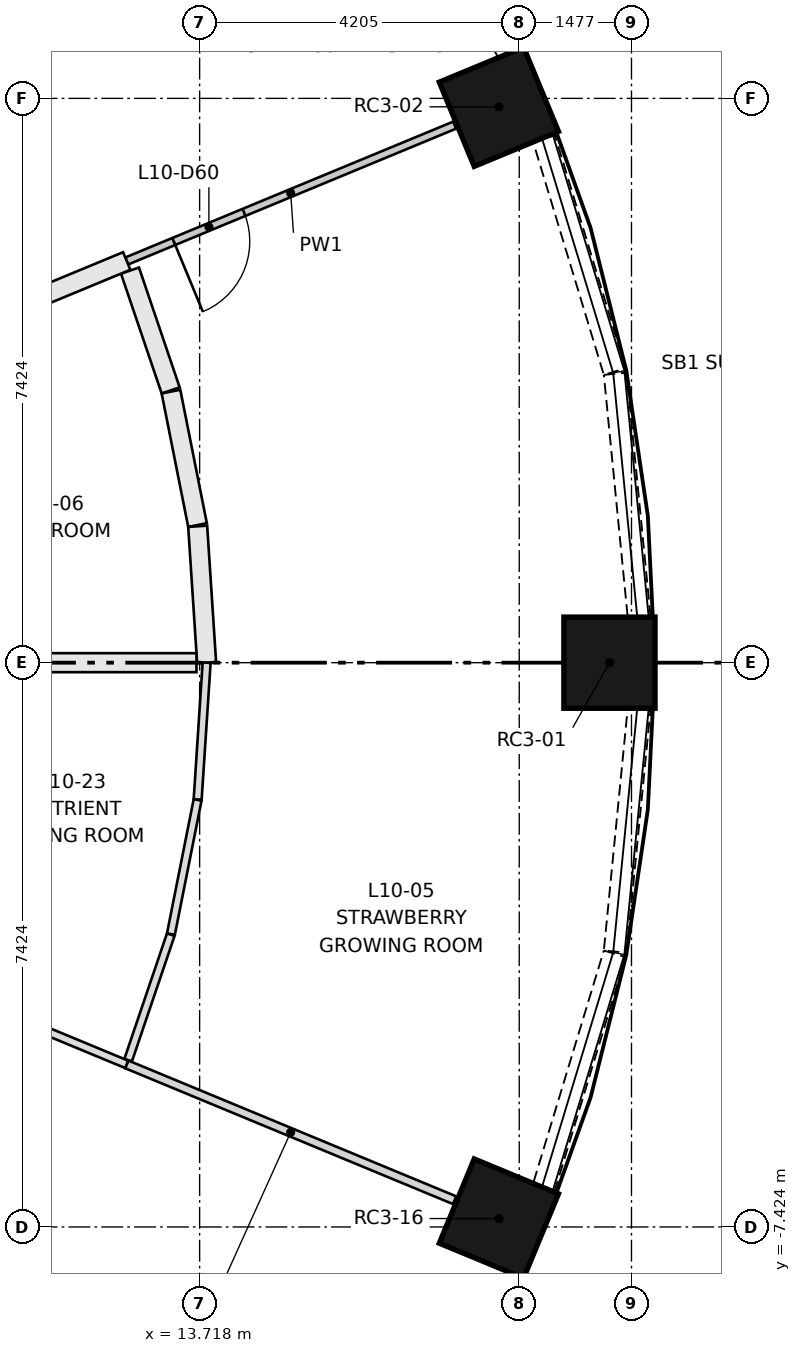
"""IFC4 building model, lengths in metres.
Left out: names, types, materials, properties, quantities, classifications, styles, units other than length and angle.
Written with IfcOpenShell. Run it as: python <this file> out.ifc"""

import sys

from ifc_helpers import new_model, si_unit, direction, frame, frame_2d, origin, origin_2d, place, context, subcontext, project, spatial, rectangle, extrude, element, fill, save


model = new_model("IFC4")
c1 = context("Model", 3, precision=1e-05, world=origin(), true_north=direction((0.0, 1.0)))
c2 = subcontext(c1, "Body", "Model", "MODEL_VIEW")
j1 = project(units=[si_unit("LENGTHUNIT", "METRE"), si_unit("PLANEANGLEUNIT", "RADIAN")], contexts=[c1])
p1 = place(None, origin())
s1 = spatial("IfcSite", under=j1, at=p1, CompositionType="ELEMENT")
p2 = place(p1, origin())
s2 = spatial("IfcBuilding", under=s1, at=p2, CompositionType="ELEMENT")
p3 = place(p2, frame((0.0, 0.0, 40.8)))
s3 = spatial("IfcBuildingStorey", under=s2, at=p3, CompositionType="ELEMENT", Elevation=40.8)
for number, where, z_axis, x_axis in (
    (1, (19.11, 0.0, 0.0), (0.0, 0.0, 1.0), (1.0, 0.0, 0.0)),
    (2, (17.655, 7.313, 0.0), (0.0, 0.0, 1.0), (0.924, 0.383, 0.0)),
    (3, (17.655, -7.313, 0.0), (0.0, 0.0, 1.0), (0.924, -0.383, 0.0)),
):
    element("IfcColumn", number, at=place(p3, frame(where, z_axis=z_axis, x_axis=x_axis)), inside=s3, PredefinedType="COLUMN", context=c2, shape_type="SweptSolid", body=[
        extrude(rectangle(XDim=1.2, YDim=1.2, at=origin_2d()), origin(), (0.0, 0.0, 1.0), 3.65),
    ])
p4 = place(p3, frame((19.5, 0.613, 0.0), z_axis=(0.0, 0.0, 1.0), x_axis=(-0.098002102993, 0.995186207606, 0.0)))
e4 = element("IfcWall", 4, at=p4, inside=s3, PredefinedType="SOLIDWALL", context=c2, shape_type="SweptSolid", body=[
    extrude(rectangle(XDim=3.204, YDim=0.3, at=frame_2d((1.602, 0.0))), origin(), (0.0, 0.0, 1.0), 0.9),
])
p5 = place(p3, frame((19.18, 3.83, 0.0), z_axis=(0.0, 0.0, 1.0), x_axis=(-0.290472877795, 0.956883225512, 0.0)))
e5 = element("IfcWall", 5, at=p5, inside=s3, PredefinedType="SOLIDWALL", context=c2, shape_type="SweptSolid", body=[
    extrude(rectangle(XDim=3.202, YDim=0.3, at=frame_2d((1.601, 0.0))), origin(), (0.0, 0.0, 1.0), 0.9),
])
for number, where, z_axis, x_axis in (
    (6, (17.78, 8.028, 0.0), (0.0, 0.0, 1.0), (-0.471, 0.882, 0.0)),
    (7, (16.27, -10.854, 0.0), (0.0, 0.0, 1.0), (0.471, 0.882, 0.0)),
):
    element("IfcWall", number, at=place(p3, frame(where, z_axis=z_axis, x_axis=x_axis)), inside=s3, PredefinedType="SOLIDWALL", context=c2, shape_type="SweptSolid", body=[
        extrude(rectangle(XDim=3.204, YDim=0.3, at=frame_2d((1.602, 0.0))), origin(), (0.0, 0.0, 1.0), 0.9),
    ])
p6 = place(p3, frame((18.25, -6.895, 0.0), z_axis=(0.0, 0.0, 1.0), x_axis=(0.290472877795, 0.956883225512, 0.0)))
e8 = element("IfcWall", 8, at=p6, inside=s3, PredefinedType="SOLIDWALL", context=c2, shape_type="SweptSolid", body=[
    extrude(rectangle(XDim=3.202, YDim=0.3, at=frame_2d((1.601, 0.0))), origin(), (0.0, 0.0, 1.0), 0.9),
])
p7 = place(p3, frame((19.186, -3.801, 0.0), z_axis=(0.0, 0.0, 1.0), x_axis=(0.098002102993, 0.995186207606, 0.0)))
e9 = element("IfcWall", 9, at=p7, inside=s3, PredefinedType="SOLIDWALL", context=c2, shape_type="SweptSolid", body=[
    extrude(rectangle(XDim=3.204, YDim=0.3, at=frame_2d((1.602, 0.0))), origin(), (0.0, 0.0, 1.0), 0.9),
])
p8 = place(p3, frame((13.337, 3.582, 0.0), z_axis=(0.0, 0.0, 1.0), x_axis=(-0.321458381335, 0.946923708157, 0.0)))
e10 = element("IfcWall", 10, at=p8, inside=s3, PredefinedType="PARTITIONING", context=c2, shape_type="SweptSolid", body=[
    extrude(rectangle(XDim=1.665, YDim=0.25, at=frame_2d((0.833, 0.0))), origin(), (0.0, 0.0, 1.0), 3.3),
])
p9 = place(p3, frame((13.69, 1.811, 0.0), z_axis=(0.0, 0.0, 1.0), x_axis=(-0.195014530736, 0.980800353182, 0.0)))
e11 = element("IfcWall", 11, at=p9, inside=s3, PredefinedType="PARTITIONING", context=c2, shape_type="SweptSolid", body=[
    extrude(rectangle(XDim=1.79, YDim=0.25, at=frame_2d((0.895, 0.0))), origin(), (0.0, 0.0, 1.0), 3.3),
])
p10 = place(p3, frame((13.81, 0.0, 0.0), z_axis=(0.0, 0.0, 1.0), x_axis=(-0.065437674742, 0.997856658406, 0.0)))
e12 = element("IfcWall", 12, at=p10, inside=s3, PredefinedType="PARTITIONING", context=c2, shape_type="SweptSolid", body=[
    extrude(rectangle(XDim=1.798, YDim=0.25, at=frame_2d((0.899, 0.0))), origin(), (0.0, 0.0, 1.0), 3.3),
])
p11 = place(p3, frame((17.073, 7.072, 0.0), z_axis=(0.0, 0.0, 1.0), x_axis=(-0.92387920118, -0.382684232268, 0.0)))
e13 = element("IfcWall", 13, at=p11, inside=s3, PredefinedType="PARTITIONING", context=c2, shape_type="SweptSolid", body=[
    extrude(rectangle(XDim=4.67, YDim=0.1, at=frame_2d((2.335, 0.0))), origin(), (0.0, 0.0, 1.0), 3.3),
])
p12 = place(p11, frame((3.0, 0.0, 0.0)))
e14 = element("IfcOpeningElement", 14, at=p12, cuts=e13, PredefinedType="OPENING", context=c2, shape_type="SweptSolid", body=[
    extrude(rectangle(XDim=1.0, YDim=2.1, at=frame_2d((0.5, 1.05))), frame((0.0, 0.06, 0.0), z_axis=(0.0, -1.0, 0.0), x_axis=(1.0, 0.0, 0.0)), (0.0, 0.0, 1.0), 0.12),
])
p13 = place(p3, frame((17.073, -7.072, 0.0), z_axis=(0.0, 0.0, 1.0), x_axis=(-0.92387920118, 0.382684232268, 0.0)))
e15 = element("IfcWall", 15, at=p13, inside=s3, PredefinedType="PARTITIONING", context=c2, shape_type="SweptSolid", body=[
    extrude(rectangle(XDim=4.67, YDim=0.11, at=frame_2d((2.335, 0.0))), origin(), (0.0, 0.0, 1.0), 3.3),
])
p14 = place(p3, frame((12.778, -5.229, 0.0), z_axis=(0.0, 0.0, 1.0), x_axis=(0.321513757885, 0.946904907311, 0.0)))
e16 = element("IfcWall", 16, at=p14, inside=s3, PredefinedType="PARTITIONING", context=c2, shape_type="SweptSolid", body=[
    extrude(rectangle(XDim=1.744, YDim=0.105, at=frame_2d((0.872, 0.0))), origin(), (0.0, 0.0, 1.0), 3.3),
])
p15 = place(p3, frame((13.34, -3.571, 0.0), z_axis=(0.0, 0.0, 1.0), x_axis=(0.195098478373, 0.980783657968, 0.0)))
e17 = element("IfcWall", 17, at=p15, inside=s3, PredefinedType="PARTITIONING", context=c2, shape_type="SweptSolid", body=[
    extrude(rectangle(XDim=1.8, YDim=0.105, at=frame_2d((0.9, 0.0))), origin(), (0.0, 0.0, 1.0), 3.3),
])
p16 = place(p3, frame((13.692, -1.799, 0.0), z_axis=(0.0, 0.0, 1.0), x_axis=(0.065395671101, 0.997859412042, 0.0)))
e18 = element("IfcWall", 18, at=p16, inside=s3, PredefinedType="PARTITIONING", context=c2, shape_type="SweptSolid", body=[
    extrude(rectangle(XDim=1.803, YDim=0.105, at=frame_2d((0.902, 0.0))), origin(), (0.0, 0.0, 1.0), 3.3),
])
p17 = place(p3, frame((10.047, 4.162, 0.0), z_axis=(0.0, 0.0, 1.0), x_axis=(0.92388200997, 0.382677451195, 0.0)))
e19 = element("IfcWall", 19, at=p17, inside=s3, PredefinedType="PARTITIONING", context=c2, shape_type="SweptSolid", body=[
    extrude(rectangle(XDim=2.935, YDim=0.25, at=frame_2d((1.468, 0.0))), origin(), (0.0, 0.0, 1.0), 3.3),
])
p18 = place(p3, frame((13.677, 0.0, 0.0), z_axis=(0.0, 0.0, 1.0), x_axis=(-1.0, 0.0, 0.0)))
e20 = element("IfcWall", 20, at=p18, inside=s3, PredefinedType="PARTITIONING", context=c2, shape_type="SweptSolid", body=[
    extrude(rectangle(XDim=3.677, YDim=0.25, at=frame_2d((1.839, 0.0))), origin(), (0.0, 0.0, 1.0), 3.3),
])
p19 = place(p3, frame((9.957, -4.124, 0.0), z_axis=(0.0, 0.0, 1.0), x_axis=(0.923860842545, -0.382728550819, 0.0)))
e21 = element("IfcWall", 21, at=p19, inside=s3, PredefinedType="PARTITIONING", context=c2, shape_type="SweptSolid", body=[
    extrude(rectangle(XDim=3.033, YDim=0.105, at=frame_2d((1.517, 0.0))), origin(), (0.0, 0.0, 1.0), 3.3),
])
p20 = place(p12, origin())
e22 = element("IfcDoor", 22, at=p20, inside=s3, OperationType="SINGLE_SWING_RIGHT", PredefinedType="DOOR", context=c2, shape_type="SweptSolid", body=[
    extrude(rectangle(XDim=1.0, YDim=2.1, at=frame_2d((0.5, 1.05))), frame((0.0, 0.025, 0.0), z_axis=(0.0, -1.0, 0.0), x_axis=(1.0, 0.0, 0.0)), (0.0, 0.0, 1.0), 0.05),
])
fill(e14, e22)
save(model, sys.argv[1])
